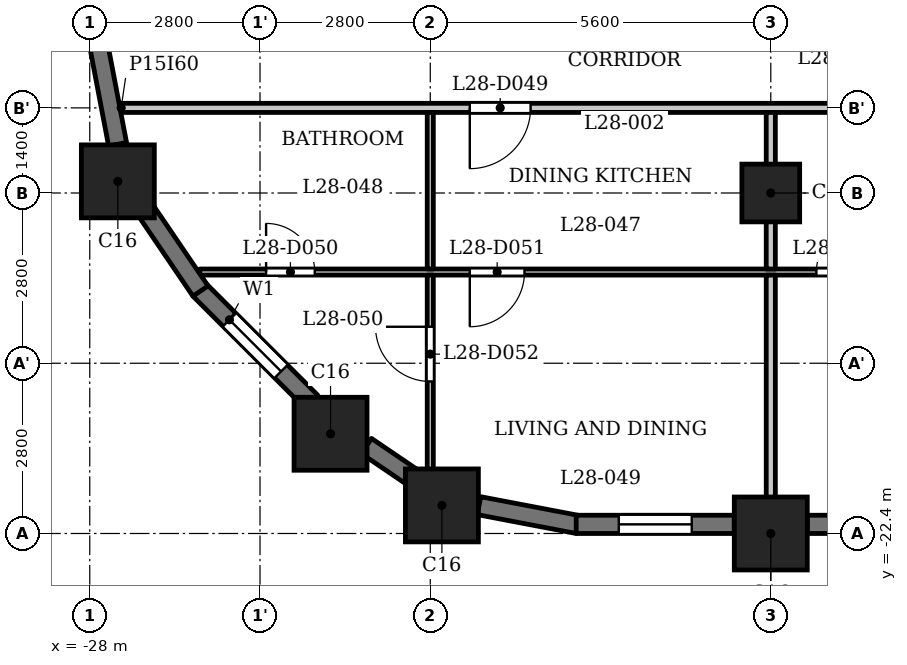
"""IFC4 building model, lengths in metres.
Left out: names, types, materials, properties, quantities, classifications, styles, units other than length and angle.
Written with IfcOpenShell. Run it as: python <this file> out.ifc"""

import sys

from ifc_helpers import new_model, si_unit, direction, frame, frame_2d, origin, origin_2d, place, context, subcontext, project, spatial, rectangle, extrude, element, fill, save


model = new_model("IFC4")
c1 = context("Model", 3, precision=1e-05, world=origin(), true_north=direction((0.0, 1.0)))
c2 = subcontext(c1, "Body", "Model", "MODEL_VIEW")
j1 = project(units=[si_unit("LENGTHUNIT", "METRE"), si_unit("PLANEANGLEUNIT", "RADIAN")], contexts=[c1])
p1 = place(None, origin())
s1 = spatial("IfcSite", under=j1, at=p1, CompositionType="ELEMENT")
p2 = place(p1, origin())
s2 = spatial("IfcBuilding", under=s1, at=p2, CompositionType="ELEMENT")
p3 = place(p2, frame((0.0, 0.0, 111.3)))
s3 = spatial("IfcBuildingStorey", under=s2, at=p3, CompositionType="ELEMENT", Elevation=111.3)
for number, where, z_axis, x_axis in (
    (1, (-22.209, -21.938, 0.0), (0.0, 0.0, 1.0), (1.0, 0.0, 0.0)),
    (2, (-16.8, -22.4, 0.0), (0.0, 0.0, 1.0), (1.0, 0.0, 0.0)),
    (3, (-27.538, -16.609, 0.0), (0.0, 0.0, 1.0), (1.0, 0.0, 0.0)),
    (4, (-24.04, -20.76, 0.0), (0.0, 0.0, 1.0), (1.0, 0.0, 0.0)),
):
    element("IfcColumn", number, at=place(p3, frame(where, z_axis=z_axis, x_axis=x_axis)), inside=s3, PredefinedType="COLUMN", context=c2, shape_type="SweptSolid", body=[
        extrude(rectangle(XDim=1.2, YDim=1.2, at=origin_2d()), origin(), (0.0, 0.0, 1.0), 3.5),
    ])
p4 = place(p3, frame((-16.8, -16.8, 0.0), z_axis=(0.0, 0.0, 1.0), x_axis=(1.0, 0.0, 0.0)))
e5 = element("IfcColumn", 5, at=p4, inside=s3, PredefinedType="COLUMN", context=c2, shape_type="SweptSolid", body=[
    extrude(rectangle(XDim=0.95, YDim=0.95, at=origin_2d()), origin(), (0.0, 0.0, 1.0), 3.5),
])
p5 = place(p3, frame((-26.197, -18.391, 0.0), z_axis=(0.0, 0.0, 1.0), x_axis=(0.707059830104, -0.707153729152, 0.0)))
e6 = element("IfcWall", 6, at=p5, inside=s3, PredefinedType="SOLIDWALL", context=c2, shape_type="SweptSolid", body=[
    extrude(rectangle(XDim=2.6, YDim=0.3, at=frame_2d((1.3, 0.0))), origin(), (0.0, 0.0, 1.0), 2.4),
])
p6 = place(p5, frame((0.7, 0.0, 0.6)))
e7 = element("IfcOpeningElement", 7, at=p6, cuts=e6, PredefinedType="OPENING", context=c2, shape_type="SweptSolid", body=[
    extrude(rectangle(XDim=1.2, YDim=1.55, at=frame_2d((0.6, 0.775))), frame((0.0, 0.16, 0.0), z_axis=(0.0, -1.0, 0.0), x_axis=(1.0, 0.0, 0.0)), (0.0, 0.0, 1.0), 0.32),
])
p7 = place(p3, frame((-23.451, -20.96, 0.0), z_axis=(0.0, 0.0, 1.0), x_axis=(0.827019434577, -0.562173331661, 0.0)))
e8 = element("IfcWall", 8, at=p7, inside=s3, PredefinedType="SOLIDWALL", context=c2, shape_type="SweptSolid", body=[
    extrude(rectangle(XDim=0.977, YDim=0.3, at=frame_2d((0.489, 0.0))), origin(), (0.0, 0.0, 1.0), 3.2),
])
p8 = place(p3, frame((-21.599, -21.942, 0.0), z_axis=(0.0, 0.0, 1.0), x_axis=(0.98228820662, -0.187376303559, 0.0)))
e9 = element("IfcWall", 9, at=p8, inside=s3, PredefinedType="SOLIDWALL", context=c2, shape_type="SweptSolid", body=[
    extrude(rectangle(XDim=1.656, YDim=0.3, at=frame_2d((0.828, 0.0))), origin(), (0.0, 0.0, 1.0), 2.4),
])
p9 = place(p3, frame((-20.0, -22.25, 0.0), z_axis=(0.0, 0.0, 1.0), x_axis=(1.0, 0.0, 0.0)))
e10 = element("IfcWall", 10, at=p9, inside=s3, PredefinedType="SOLIDWALL", context=c2, shape_type="SweptSolid", body=[
    extrude(rectangle(XDim=2.6, YDim=0.3, at=frame_2d((1.3, 0.0))), origin(), (0.0, 0.0, 1.0), 2.4),
])
p10 = place(p9, frame((0.7, 0.0, 0.6)))
e11 = element("IfcOpeningElement", 11, at=p10, cuts=e10, PredefinedType="OPENING", context=c2, shape_type="SweptSolid", body=[
    extrude(rectangle(XDim=1.2, YDim=1.55, at=frame_2d((0.6, 0.775))), frame((0.0, 0.16, 0.0), z_axis=(0.0, -1.0, 0.0), x_axis=(1.0, 0.0, 0.0)), (0.0, 0.0, 1.0), 0.32),
])
p11 = place(p3, frame((-16.2, -22.25, 0.0), z_axis=(0.0, 0.0, 1.0), x_axis=(1.0, 0.0, 0.0)))
e12 = element("IfcWall", 12, at=p11, inside=s3, PredefinedType="SOLIDWALL", context=c2, shape_type="SweptSolid", body=[
    extrude(rectangle(XDim=4.4, YDim=0.3, at=frame_2d((2.2, 0.0))), origin(), (0.0, 0.0, 1.0), 2.4),
])
p12 = place(p11, frame((0.4, 0.0, 1.2)))
e13 = element("IfcOpeningElement", 13, at=p12, cuts=e12, PredefinedType="OPENING", context=c2, shape_type="SweptSolid", body=[
    extrude(rectangle(XDim=3.6, YDim=0.95, at=frame_2d((1.8, 0.475))), frame((0.0, 0.16, 0.0), z_axis=(0.0, -1.0, 0.0), x_axis=(1.0, 0.0, 0.0)), (0.0, 0.0, 1.0), 0.32),
])
for number, where, z_axis, x_axis in (
    (14, (-27.853, -14.372, 0.0), (0.0, 0.0, 1.0), (0.187, -0.982, 0.0)),
    (15, (-27.11, -17.043, 0.0), (0.0, 0.0, 1.0), (0.562, -0.827, 0.0)),
):
    element("IfcWall", number, at=place(p3, frame(where, z_axis=z_axis, x_axis=x_axis)), inside=s3, PredefinedType="SOLIDWALL", context=c2, shape_type="SweptSolid", body=[
        extrude(rectangle(XDim=1.656, YDim=0.3, at=frame_2d((0.828, 0.0))), origin(), (0.0, 0.0, 1.0), 2.4),
    ])
p13 = place(p3, frame((-26.19, -18.1, 0.0), z_axis=(0.0, 0.0, 1.0), x_axis=(1.0, 0.0, 0.0)))
e16 = element("IfcWall", 16, at=p13, inside=s3, PredefinedType="PARTITIONING", context=c2, shape_type="SweptSolid", body=[
    extrude(rectangle(XDim=52.63, YDim=0.1, at=frame_2d((26.315, 0.0))), origin(), (0.0, 0.0, 1.0), 3.2),
])
p14 = place(p13, frame((1.09, 0.0, 0.0)))
e17 = element("IfcOpeningElement", 17, at=p14, cuts=e16, PredefinedType="OPENING", context=c2, shape_type="SweptSolid", body=[
    extrude(rectangle(XDim=0.8, YDim=2.1, at=frame_2d((0.4, 1.05))), frame((0.0, 0.06, 0.0), z_axis=(0.0, -1.0, 0.0), x_axis=(1.0, 0.0, 0.0)), (0.0, 0.0, 1.0), 0.12),
])
p15 = place(p13, frame((4.44, 0.0, 0.0)))
e18 = element("IfcOpeningElement", 18, at=p15, cuts=e16, PredefinedType="OPENING", context=c2, shape_type="SweptSolid", body=[
    extrude(rectangle(XDim=0.9, YDim=2.1, at=frame_2d((0.45, 1.05))), frame((0.0, 0.06, 0.0), z_axis=(0.0, -1.0, 0.0), x_axis=(1.0, 0.0, 0.0)), (0.0, 0.0, 1.0), 0.12),
])
p16 = place(p13, frame((10.14, 0.0, 0.0)))
e19 = element("IfcOpeningElement", 19, at=p16, cuts=e16, PredefinedType="OPENING", context=c2, shape_type="SweptSolid", body=[
    extrude(rectangle(XDim=0.8, YDim=2.1, at=frame_2d((0.4, 1.05))), frame((0.0, 0.06, 0.0), z_axis=(0.0, -1.0, 0.0), x_axis=(1.0, 0.0, 0.0)), (0.0, 0.0, 1.0), 0.12),
])
p17 = place(p13, frame((12.74, 0.0, 0.0)))
e20 = element("IfcOpeningElement", 20, at=p17, cuts=e16, PredefinedType="OPENING", context=c2, shape_type="SweptSolid", body=[
    extrude(rectangle(XDim=0.9, YDim=2.1, at=frame_2d((0.45, 1.05))), frame((0.0, 0.06, 0.0), z_axis=(0.0, -1.0, 0.0), x_axis=(1.0, 0.0, 0.0)), (0.0, 0.0, 1.0), 0.12),
])
p18 = place(p13, frame((16.14, 0.0, 0.0)))
e21 = element("IfcOpeningElement", 21, at=p18, cuts=e16, PredefinedType="OPENING", context=c2, shape_type="SweptSolid", body=[
    extrude(rectangle(XDim=0.9, YDim=2.1, at=frame_2d((0.45, 1.05))), frame((0.0, 0.06, 0.0), z_axis=(0.0, -1.0, 0.0), x_axis=(1.0, 0.0, 0.0)), (0.0, 0.0, 1.0), 0.12),
])
p19 = place(p13, frame((18.99, 0.0, 0.0)))
e22 = element("IfcOpeningElement", 22, at=p19, cuts=e16, PredefinedType="OPENING", context=c2, shape_type="SweptSolid", body=[
    extrude(rectangle(XDim=0.9, YDim=2.1, at=frame_2d((0.45, 1.05))), frame((0.0, 0.06, 0.0), z_axis=(0.0, -1.0, 0.0), x_axis=(1.0, 0.0, 0.0)), (0.0, 0.0, 1.0), 0.12),
])
p20 = place(p13, frame((26.84, 0.0, 0.0)))
e23 = element("IfcOpeningElement", 23, at=p20, cuts=e16, PredefinedType="OPENING", context=c2, shape_type="SweptSolid", body=[
    extrude(rectangle(XDim=0.8, YDim=2.1, at=frame_2d((0.4, 1.05))), frame((0.0, 0.06, 0.0), z_axis=(0.0, -1.0, 0.0), x_axis=(1.0, 0.0, 0.0)), (0.0, 0.0, 1.0), 0.12),
])
p21 = place(p13, frame((21.24, 0.0, 0.0)))
e24 = element("IfcOpeningElement", 24, at=p21, cuts=e16, PredefinedType="OPENING", context=c2, shape_type="SweptSolid", body=[
    extrude(rectangle(XDim=0.9, YDim=2.1, at=frame_2d((0.45, 1.05))), frame((0.0, 0.06, 0.0), z_axis=(0.0, -1.0, 0.0), x_axis=(1.0, 0.0, 0.0)), (0.0, 0.0, 1.0), 0.12),
])
p22 = place(p13, frame((32.54, 0.0, 0.0)))
e25 = element("IfcOpeningElement", 25, at=p22, cuts=e16, PredefinedType="OPENING", context=c2, shape_type="SweptSolid", body=[
    extrude(rectangle(XDim=0.8, YDim=2.1, at=frame_2d((0.4, 1.05))), frame((0.0, 0.06, 0.0), z_axis=(0.0, -1.0, 0.0), x_axis=(1.0, 0.0, 0.0)), (0.0, 0.0, 1.0), 0.12),
])
p23 = place(p13, frame((35.14, 0.0, 0.0)))
e26 = element("IfcOpeningElement", 26, at=p23, cuts=e16, PredefinedType="OPENING", context=c2, shape_type="SweptSolid", body=[
    extrude(rectangle(XDim=0.9, YDim=2.1, at=frame_2d((0.45, 1.05))), frame((0.0, 0.06, 0.0), z_axis=(0.0, -1.0, 0.0), x_axis=(1.0, 0.0, 0.0)), (0.0, 0.0, 1.0), 0.12),
])
p24 = place(p13, frame((38.54, 0.0, 0.0)))
e27 = element("IfcOpeningElement", 27, at=p24, cuts=e16, PredefinedType="OPENING", context=c2, shape_type="SweptSolid", body=[
    extrude(rectangle(XDim=0.9, YDim=2.1, at=frame_2d((0.45, 1.05))), frame((0.0, 0.06, 0.0), z_axis=(0.0, -1.0, 0.0), x_axis=(1.0, 0.0, 0.0)), (0.0, 0.0, 1.0), 0.12),
])
p25 = place(p13, frame((41.39, 0.0, 0.0)))
e28 = element("IfcOpeningElement", 28, at=p25, cuts=e16, PredefinedType="OPENING", context=c2, shape_type="SweptSolid", body=[
    extrude(rectangle(XDim=0.9, YDim=2.1, at=frame_2d((0.45, 1.05))), frame((0.0, 0.06, 0.0), z_axis=(0.0, -1.0, 0.0), x_axis=(1.0, 0.0, 0.0)), (0.0, 0.0, 1.0), 0.12),
])
p26 = place(p13, frame((49.204, 0.0, 0.0)))
e29 = element("IfcOpeningElement", 29, at=p26, cuts=e16, PredefinedType="OPENING", context=c2, shape_type="SweptSolid", body=[
    extrude(rectangle(XDim=0.8, YDim=2.1, at=frame_2d((0.4, 1.05))), frame((0.0, 0.06, 0.0), z_axis=(0.0, -1.0, 0.0), x_axis=(1.0, 0.0, 0.0)), (0.0, 0.0, 1.0), 0.12),
])
p27 = place(p13, frame((43.64, 0.0, 0.0)))
e30 = element("IfcOpeningElement", 30, at=p27, cuts=e16, PredefinedType="OPENING", context=c2, shape_type="SweptSolid", body=[
    extrude(rectangle(XDim=0.9, YDim=2.1, at=frame_2d((0.45, 1.05))), frame((0.0, 0.06, 0.0), z_axis=(0.0, -1.0, 0.0), x_axis=(1.0, 0.0, 0.0)), (0.0, 0.0, 1.0), 0.12),
])
p28 = place(p3, frame((-27.484, -15.4, 0.0), z_axis=(0.0, 0.0, 1.0), x_axis=(1.0, 0.0, 0.0)))
e31 = element("IfcWall", 31, at=p28, inside=s3, PredefinedType="PARTITIONING", context=c2, shape_type="SweptSolid", body=[
    extrude(rectangle(XDim=54.968, YDim=0.15, at=frame_2d((27.484, 0.0))), origin(), (0.0, 0.0, 1.0), 3.2),
])
p29 = place(p28, frame((5.734, 0.0, 0.0)))
e32 = element("IfcOpeningElement", 32, at=p29, cuts=e31, PredefinedType="OPENING", context=c2, shape_type="SweptSolid", body=[
    extrude(rectangle(XDim=1.0, YDim=2.1, at=frame_2d((0.5, 1.05))), frame((0.0, 0.085, 0.0), z_axis=(0.0, -1.0, 0.0), x_axis=(1.0, 0.0, 0.0)), (0.0, 0.0, 1.0), 0.17),
])
p30 = place(p28, frame((16.934, 0.0, 0.0)))
e33 = element("IfcOpeningElement", 33, at=p30, cuts=e31, PredefinedType="OPENING", context=c2, shape_type="SweptSolid", body=[
    extrude(rectangle(XDim=1.0, YDim=2.1, at=frame_2d((0.5, 1.05))), frame((0.0, 0.085, 0.0), z_axis=(0.0, -1.0, 0.0), x_axis=(1.0, 0.0, 0.0)), (0.0, 0.0, 1.0), 0.17),
])
p31 = place(p28, frame((22.534, 0.0, 0.0)))
e34 = element("IfcOpeningElement", 34, at=p31, cuts=e31, PredefinedType="OPENING", context=c2, shape_type="SweptSolid", body=[
    extrude(rectangle(XDim=1.0, YDim=2.1, at=frame_2d((0.5, 1.05))), frame((0.0, 0.085, 0.0), z_axis=(0.0, -1.0, 0.0), x_axis=(1.0, 0.0, 0.0)), (0.0, 0.0, 1.0), 0.17),
])
p32 = place(p28, frame((39.334, 0.0, 0.0)))
e35 = element("IfcOpeningElement", 35, at=p32, cuts=e31, PredefinedType="OPENING", context=c2, shape_type="SweptSolid", body=[
    extrude(rectangle(XDim=1.0, YDim=2.1, at=frame_2d((0.5, 1.05))), frame((0.0, 0.085, 0.0), z_axis=(0.0, -1.0, 0.0), x_axis=(1.0, 0.0, 0.0)), (0.0, 0.0, 1.0), 0.17),
])
p33 = place(p28, frame((44.934, 0.0, 0.0)))
e36 = element("IfcOpeningElement", 36, at=p33, cuts=e31, PredefinedType="OPENING", context=c2, shape_type="SweptSolid", body=[
    extrude(rectangle(XDim=1.0, YDim=2.1, at=frame_2d((0.5, 1.05))), frame((0.0, 0.085, 0.0), z_axis=(0.0, -1.0, 0.0), x_axis=(1.0, 0.0, 0.0)), (0.0, 0.0, 1.0), 0.17),
])
p34 = place(p3, frame((-22.4, -21.72, 0.0), z_axis=(0.0, 0.0, 1.0), x_axis=(0.0, 1.0, 0.0)))
e37 = element("IfcWall", 37, at=p34, inside=s3, PredefinedType="PARTITIONING", context=c2, shape_type="SweptSolid", body=[
    extrude(rectangle(XDim=3.57, YDim=0.1, at=frame_2d((1.785, 0.0))), origin(), (0.0, 0.0, 1.0), 3.2),
])
p35 = place(p34, frame((1.82, 0.0, 0.0)))
e38 = element("IfcOpeningElement", 38, at=p35, cuts=e37, PredefinedType="OPENING", context=c2, shape_type="SweptSolid", body=[
    extrude(rectangle(XDim=0.9, YDim=2.1, at=frame_2d((0.45, 1.05))), frame((0.0, 0.06, 0.0), z_axis=(0.0, -1.0, 0.0), x_axis=(1.0, 0.0, 0.0)), (0.0, 0.0, 1.0), 0.12),
])
p36 = place(p3, frame((-22.4, -18.05, 0.0), z_axis=(0.0, 0.0, 1.0), x_axis=(0.0, 1.0, 0.0)))
e39 = element("IfcWall", 39, at=p36, inside=s3, PredefinedType="PARTITIONING", context=c2, shape_type="SweptSolid", body=[
    extrude(rectangle(XDim=2.575, YDim=0.1, at=frame_2d((1.288, 0.0))), origin(), (0.0, 0.0, 1.0), 3.2),
])
p37 = place(p3, frame((-16.8, -22.98, 0.0), z_axis=(0.0, 0.0, 1.0), x_axis=(0.0, 1.0, 0.0)))
e40 = element("IfcWall", 40, at=p37, inside=s3, PredefinedType="PARTITIONING", context=c2, shape_type="SweptSolid", body=[
    extrude(rectangle(XDim=4.83, YDim=0.15, at=frame_2d((2.415, 0.0))), origin(), (0.0, 0.0, 1.0), 3.2),
])
p38 = place(p3, frame((-16.8, -18.05, 0.0), z_axis=(0.0, 0.0, 1.0), x_axis=(0.0, 1.0, 0.0)))
e41 = element("IfcWall", 41, at=p38, inside=s3, PredefinedType="PARTITIONING", context=c2, shape_type="SweptSolid", body=[
    extrude(rectangle(XDim=2.575, YDim=0.15, at=frame_2d((1.288, 0.0))), origin(), (0.0, 0.0, 1.0), 3.2),
])
p39 = place(p29, origin())
e42 = element("IfcDoor", 42, at=p39, inside=s3, OperationType="SINGLE_SWING_LEFT", PredefinedType="DOOR", context=c2, shape_type="SweptSolid", body=[
    extrude(rectangle(XDim=1.0, YDim=2.1, at=frame_2d((0.5, 1.05))), frame((0.0, 0.025, 0.0), z_axis=(0.0, -1.0, 0.0), x_axis=(1.0, 0.0, 0.0)), (0.0, 0.0, 1.0), 0.05),
])
fill(e32, e42)
p40 = place(p14, origin())
e43 = element("IfcDoor", 43, at=p40, inside=s3, OperationType="SINGLE_SWING_RIGHT", PredefinedType="DOOR", context=c2, shape_type="SweptSolid", body=[
    extrude(rectangle(XDim=0.8, YDim=2.1, at=frame_2d((0.4, 1.05))), frame((0.0, 0.025, 0.0), z_axis=(0.0, -1.0, 0.0), x_axis=(1.0, 0.0, 0.0)), (0.0, 0.0, 1.0), 0.05),
])
fill(e17, e43)
p41 = place(p15, origin())
e44 = element("IfcDoor", 44, at=p41, inside=s3, OperationType="SINGLE_SWING_LEFT", PredefinedType="DOOR", context=c2, shape_type="SweptSolid", body=[
    extrude(rectangle(XDim=0.9, YDim=2.1, at=frame_2d((0.45, 1.05))), frame((0.0, 0.025, 0.0), z_axis=(0.0, -1.0, 0.0), x_axis=(1.0, 0.0, 0.0)), (0.0, 0.0, 1.0), 0.05),
])
fill(e18, e44)
p42 = place(p35, origin())
e45 = element("IfcDoor", 45, at=p42, inside=s3, OperationType="SINGLE_SWING_LEFT", PredefinedType="DOOR", context=c2, shape_type="SweptSolid", body=[
    extrude(rectangle(XDim=0.9, YDim=2.1, at=frame_2d((0.45, 1.05))), frame((0.0, 0.025, 0.0), z_axis=(0.0, -1.0, 0.0), x_axis=(1.0, 0.0, 0.0)), (0.0, 0.0, 1.0), 0.05),
])
fill(e38, e45)
p43 = place(p16, origin())
e46 = element("IfcDoor", 46, at=p43, inside=s3, OperationType="SINGLE_SWING_LEFT", PredefinedType="DOOR", context=c2, shape_type="SweptSolid", body=[
    extrude(rectangle(XDim=0.8, YDim=2.1, at=frame_2d((0.4, 1.05))), frame((0.0, 0.025, 0.0), z_axis=(0.0, -1.0, 0.0), x_axis=(1.0, 0.0, 0.0)), (0.0, 0.0, 1.0), 0.05),
])
fill(e19, e46)
p44 = place(p6, origin())
e47 = element("IfcWindow", 47, at=p44, inside=s3, PartitioningType="SINGLE_PANEL", PredefinedType="WINDOW", context=c2, shape_type="SweptSolid", body=[
    extrude(rectangle(XDim=1.2, YDim=1.55, at=frame_2d((0.6, 0.775))), frame((0.0, 0.03, 0.0), z_axis=(0.0, -1.0, 0.0), x_axis=(1.0, 0.0, 0.0)), (0.0, 0.0, 1.0), 0.06),
])
fill(e7, e47)
p45 = place(p10, origin())
e48 = element("IfcWindow", 48, at=p45, inside=s3, PartitioningType="SINGLE_PANEL", PredefinedType="WINDOW", context=c2, shape_type="SweptSolid", body=[
    extrude(rectangle(XDim=1.2, YDim=1.55, at=frame_2d((0.6, 0.775))), frame((0.0, 0.03, 0.0), z_axis=(0.0, -1.0, 0.0), x_axis=(1.0, 0.0, 0.0)), (0.0, 0.0, 1.0), 0.06),
])
fill(e11, e48)
save(model, sys.argv[1])
